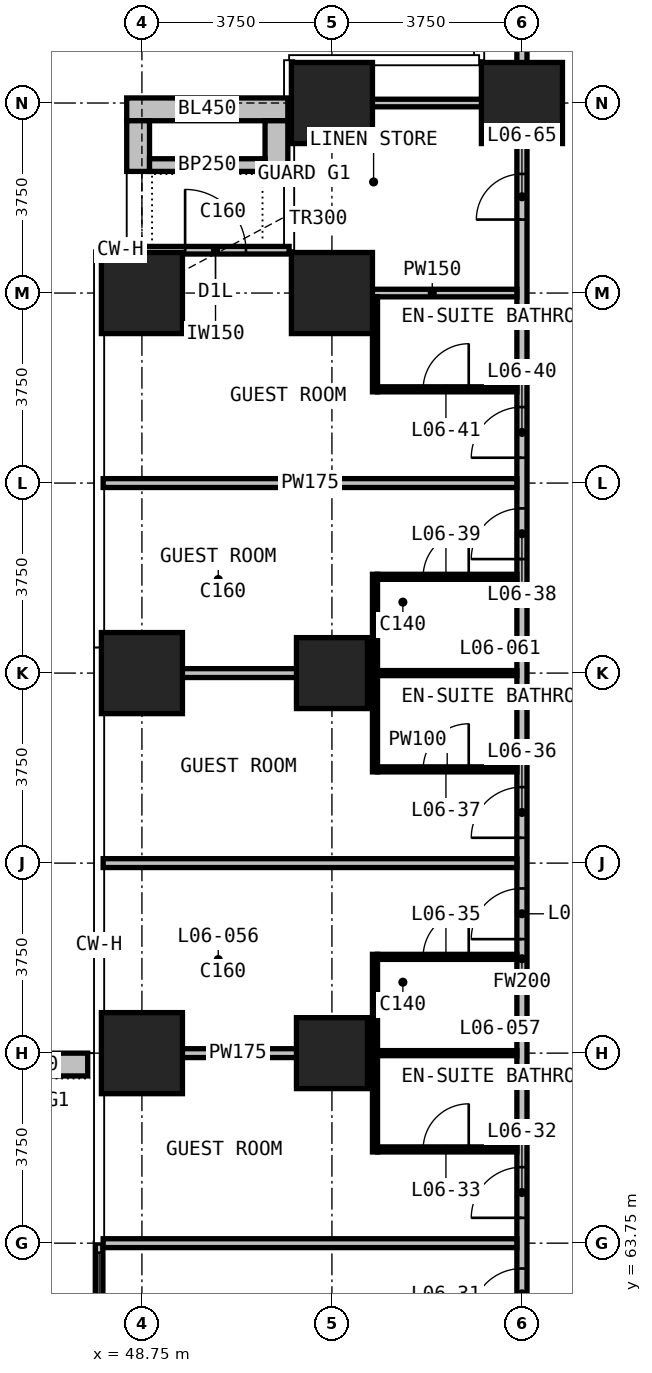
"""IFC4 building model, lengths in metres.
Left out: names, types, materials, properties, quantities, classifications, styles, units other than length and angle.
Written with IfcOpenShell. Run it as: python <this file> out.ifc"""

import sys

from ifc_helpers import new_model, si_unit, direction, frame, frame_2d, origin, origin_2d, place, context, subcontext, project, spatial, rectangle, extrude, element, fill, save


model = new_model("IFC4")
c1 = context("Model", 3, precision=1e-05, world=origin(), true_north=direction((0.0, 1.0)))
c2 = subcontext(c1, "Body", "Model", "MODEL_VIEW")
j1 = project(units=[si_unit("LENGTHUNIT", "METRE"), si_unit("PLANEANGLEUNIT", "RADIAN")], contexts=[c1])
p1 = place(None, origin())
s1 = spatial("IfcSite", under=j1, at=p1, CompositionType="ELEMENT")
p2 = place(p1, origin())
s2 = spatial("IfcBuilding", under=s1, at=p2, CompositionType="ELEMENT")
p3 = place(p2, frame((0.0, 0.0, 39.5)))
s3 = spatial("IfcBuildingStorey", under=s2, at=p3, CompositionType="ELEMENT", Elevation=39.5)
for number, where, z_axis, x_axis in (
    (1, (48.75, 67.5, 0.0), (0.0, 0.0, 1.0), (1.0, 0.0, 0.0)),
    (2, (48.75, 75.0, 0.0), (0.0, 0.0, 1.0), (1.0, 0.0, 0.0)),
    (3, (48.75, 82.5, 0.0), (0.0, 0.0, 1.0), (1.0, 0.0, 0.0)),
):
    element("IfcColumn", number, at=place(p3, frame(where, z_axis=z_axis, x_axis=x_axis)), inside=s3, PredefinedType="COLUMN", context=c2, shape_type="SweptSolid", body=[
        extrude(rectangle(XDim=1.6, YDim=1.6, at=origin_2d()), origin(), (0.0, 0.0, 1.0), 3.3),
    ])
for number, where, z_axis, x_axis in (
    (4, (52.5, 67.5, 0.0), (0.0, 0.0, 1.0), (1.0, 0.0, 0.0)),
    (5, (52.5, 75.0, 0.0), (0.0, 0.0, 1.0), (1.0, 0.0, 0.0)),
):
    element("IfcColumn", number, at=place(p3, frame(where, z_axis=z_axis, x_axis=x_axis)), inside=s3, PredefinedType="COLUMN", context=c2, shape_type="SweptSolid", body=[
        extrude(rectangle(XDim=1.4, YDim=1.4, at=origin_2d()), origin(), (0.0, 0.0, 1.0), 3.3),
    ])
for number, where, z_axis, x_axis in (
    (6, (52.5, 82.5, 0.0), (0.0, 0.0, 1.0), (1.0, 0.0, 0.0)),
    (7, (52.5, 86.25, 0.0), (0.0, 0.0, 1.0), (1.0, 0.0, 0.0)),
    (8, (56.25, 86.25, 0.0), (0.0, 0.0, 1.0), (1.0, 0.0, 0.0)),
):
    element("IfcColumn", number, at=place(p3, frame(where, z_axis=z_axis, x_axis=x_axis)), inside=s3, PredefinedType="COLUMN", context=c2, shape_type="SweptSolid", body=[
        extrude(rectangle(XDim=1.6, YDim=1.6, at=origin_2d()), origin(), (0.0, 0.0, 1.0), 3.3),
    ])
p4 = place(p3, frame((48.75, 83.345, 0.0), z_axis=(0.0, 0.0, 1.0), x_axis=(1.0, 0.0, 0.0)))
e9 = element("IfcWall", 9, at=p4, inside=s3, PredefinedType="SOLIDWALL", context=c2, shape_type="SweptSolid", body=[
    extrude(rectangle(XDim=2.905, YDim=0.15, at=frame_2d((1.453, 0.0))), origin(), (0.0, 0.0, 1.0), 3.0),
])
p5 = place(p4, frame((0.853, 0.0, 0.0)))
e10 = element("IfcOpeningElement", 10, at=p5, cuts=e9, PredefinedType="OPENING", context=c2, shape_type="SweptSolid", body=[
    extrude(rectangle(XDim=1.2, YDim=2.0, at=frame_2d((0.6, 1.0))), frame((0.0, 0.085, 0.0), z_axis=(0.0, -1.0, 0.0), x_axis=(1.0, 0.0, 0.0)), (0.0, 0.0, 1.0), 0.17),
])
p6 = place(p3, frame((47.905, 60.0, 0.0), z_axis=(0.0, 0.0, 1.0), x_axis=(0.0, 1.0, 0.0)))
e11 = element("IfcWall", 11, at=p6, inside=s3, PredefinedType="SOLIDWALL", context=c2, shape_type="SweptSolid", body=[
    extrude(rectangle(XDim=3.75, YDim=0.15, at=frame_2d((1.875, 0.0))), origin(), (0.0, 0.0, 1.0), 3.0),
])
p7 = place(p6, frame((1.275, 0.0, 0.0)))
e12 = element("IfcOpeningElement", 12, at=p7, cuts=e11, PredefinedType="OPENING", context=c2, shape_type="SweptSolid", body=[
    extrude(rectangle(XDim=1.2, YDim=2.4, at=frame_2d((0.6, 1.2))), frame((0.0, 0.085, 0.0), z_axis=(0.0, -1.0, 0.0), x_axis=(1.0, 0.0, 0.0)), (0.0, 0.0, 1.0), 0.17),
])
p8 = place(p6, frame((2.663, 0.0, 0.1)))
e13 = element("IfcOpeningElement", 13, at=p8, cuts=e11, PredefinedType="OPENING", context=c2, shape_type="SweptSolid", body=[
    extrude(rectangle(XDim=0.9, YDim=2.4, at=frame_2d((0.45, 1.2))), frame((0.0, 0.085, 0.0), z_axis=(0.0, -1.0, 0.0), x_axis=(1.0, 0.0, 0.0)), (0.0, 0.0, 1.0), 0.17),
])
p9 = place(p3, frame((48.45, 86.125, 0.0), z_axis=(0.0, 0.0, 1.0), x_axis=(1.0, 0.0, 0.0)))
e14 = element("IfcWall", 14, at=p9, inside=s3, PredefinedType="USERDEFINED", context=c2, shape_type="SweptSolid", body=[
    extrude(rectangle(XDim=3.18, YDim=0.45, at=frame_2d((1.59, 0.0))), origin(), (0.0, 0.0, 1.0), 1.1),
])
for number, where, z_axis, x_axis in (
    (15, (48.675, 84.9, 0.0), (0.0, 0.0, 1.0), (0.0, 1.0, 0.0)),
    (16, (51.405, 84.9, 0.0), (0.0, 0.0, 1.0), (0.0, 1.0, 0.0)),
):
    element("IfcWall", number, at=place(p3, frame(where, z_axis=z_axis, x_axis=x_axis)), inside=s3, PredefinedType="USERDEFINED", context=c2, shape_type="SweptSolid", body=[
        extrude(rectangle(XDim=1.0, YDim=0.45, at=frame_2d((0.5, 0.0))), origin(), (0.0, 0.0, 1.0), 1.1),
    ])
p10 = place(p3, frame((48.9, 85.025, 0.0), z_axis=(0.0, 0.0, 1.0), x_axis=(1.0, 0.0, 0.0)))
e17 = element("IfcWall", 17, at=p10, inside=s3, PredefinedType="USERDEFINED", context=c2, shape_type="SweptSolid", body=[
    extrude(rectangle(XDim=2.28, YDim=0.25, at=frame_2d((1.14, 0.0))), origin(), (0.0, 0.0, 1.0), 1.0),
])
p11 = place(p3, frame((47.68, 67.275, 0.0), z_axis=(0.0, 0.0, 1.0), x_axis=(-1.0, 0.0, 0.0)))
e18 = element("IfcWall", 18, at=p11, inside=s3, PredefinedType="USERDEFINED", context=c2, shape_type="SweptSolid", body=[
    extrude(rectangle(XDim=2.33, YDim=0.45, at=frame_2d((1.165, 0.0))), origin(), (0.0, 0.0, 1.0), 1.1),
])
p12 = place(p3, frame((56.25, 52.4, 0.0), z_axis=(0.0, 0.0, 1.0), x_axis=(0.0, 1.0, 0.0)))
e19 = element("IfcWall", 19, at=p12, inside=s3, PredefinedType="PARTITIONING", context=c2, shape_type="SweptSolid", body=[
    extrude(rectangle(XDim=33.925, YDim=0.2, at=frame_2d((16.962, 0.0))), origin(), (0.0, 0.0, 1.0), 3.0),
])
p13 = place(p12, frame((2.35, 0.0, 0.0)))
e20 = element("IfcOpeningElement", 20, at=p13, cuts=e19, PredefinedType="OPENING", context=c2, shape_type="SweptSolid", body=[
    extrude(rectangle(XDim=1.0, YDim=2.2, at=frame_2d((0.5, 1.1))), frame((0.0, 0.11, 0.0), z_axis=(0.0, -1.0, 0.0), x_axis=(1.0, 0.0, 0.0)), (0.0, 0.0, 1.0), 0.22),
])
p14 = place(p12, frame((4.35, 0.0, 0.0)))
e21 = element("IfcOpeningElement", 21, at=p14, cuts=e19, PredefinedType="OPENING", context=c2, shape_type="SweptSolid", body=[
    extrude(rectangle(XDim=1.0, YDim=2.2, at=frame_2d((0.5, 1.1))), frame((0.0, 0.11, 0.0), z_axis=(0.0, -1.0, 0.0), x_axis=(1.0, 0.0, 0.0)), (0.0, 0.0, 1.0), 0.22),
])
p15 = place(p12, frame((9.85, 0.0, 0.0)))
e22 = element("IfcOpeningElement", 22, at=p15, cuts=e19, PredefinedType="OPENING", context=c2, shape_type="SweptSolid", body=[
    extrude(rectangle(XDim=1.0, YDim=2.2, at=frame_2d((0.5, 1.1))), frame((0.0, 0.11, 0.0), z_axis=(0.0, -1.0, 0.0), x_axis=(1.0, 0.0, 0.0)), (0.0, 0.0, 1.0), 0.22),
])
p16 = place(p12, frame((11.85, 0.0, 0.0)))
e23 = element("IfcOpeningElement", 23, at=p16, cuts=e19, PredefinedType="OPENING", context=c2, shape_type="SweptSolid", body=[
    extrude(rectangle(XDim=1.0, YDim=2.2, at=frame_2d((0.5, 1.1))), frame((0.0, 0.11, 0.0), z_axis=(0.0, -1.0, 0.0), x_axis=(1.0, 0.0, 0.0)), (0.0, 0.0, 1.0), 0.22),
])
p17 = place(p12, frame((17.35, 0.0, 0.0)))
e24 = element("IfcOpeningElement", 24, at=p17, cuts=e19, PredefinedType="OPENING", context=c2, shape_type="SweptSolid", body=[
    extrude(rectangle(XDim=1.0, YDim=2.2, at=frame_2d((0.5, 1.1))), frame((0.0, 0.11, 0.0), z_axis=(0.0, -1.0, 0.0), x_axis=(1.0, 0.0, 0.0)), (0.0, 0.0, 1.0), 0.22),
])
p18 = place(p12, frame((19.35, 0.0, 0.0)))
e25 = element("IfcOpeningElement", 25, at=p18, cuts=e19, PredefinedType="OPENING", context=c2, shape_type="SweptSolid", body=[
    extrude(rectangle(XDim=1.0, YDim=2.2, at=frame_2d((0.5, 1.1))), frame((0.0, 0.11, 0.0), z_axis=(0.0, -1.0, 0.0), x_axis=(1.0, 0.0, 0.0)), (0.0, 0.0, 1.0), 0.22),
])
p19 = place(p12, frame((24.85, 0.0, 0.0)))
e26 = element("IfcOpeningElement", 26, at=p19, cuts=e19, PredefinedType="OPENING", context=c2, shape_type="SweptSolid", body=[
    extrude(rectangle(XDim=1.0, YDim=2.2, at=frame_2d((0.5, 1.1))), frame((0.0, 0.11, 0.0), z_axis=(0.0, -1.0, 0.0), x_axis=(1.0, 0.0, 0.0)), (0.0, 0.0, 1.0), 0.22),
])
p20 = place(p12, frame((26.85, 0.0, 0.0)))
e27 = element("IfcOpeningElement", 27, at=p20, cuts=e19, PredefinedType="OPENING", context=c2, shape_type="SweptSolid", body=[
    extrude(rectangle(XDim=1.0, YDim=2.2, at=frame_2d((0.5, 1.1))), frame((0.0, 0.11, 0.0), z_axis=(0.0, -1.0, 0.0), x_axis=(1.0, 0.0, 0.0)), (0.0, 0.0, 1.0), 0.22),
])
p21 = place(p12, frame((31.55, 0.0, 0.0)))
e28 = element("IfcOpeningElement", 28, at=p21, cuts=e19, PredefinedType="OPENING", context=c2, shape_type="SweptSolid", body=[
    extrude(rectangle(XDim=0.9, YDim=2.2, at=frame_2d((0.45, 1.1))), frame((0.0, 0.11, 0.0), z_axis=(0.0, -1.0, 0.0), x_axis=(1.0, 0.0, 0.0)), (0.0, 0.0, 1.0), 0.22),
])
p22 = place(p3, frame((56.25, 86.28, 0.0), z_axis=(0.0, 0.0, 1.0), x_axis=(0.0, 1.0, 0.0)))
e29 = element("IfcWall", 29, at=p22, inside=s3, PredefinedType="PARTITIONING", context=c2, shape_type="SweptSolid", body=[
    extrude(rectangle(XDim=4.365, YDim=0.2, at=frame_2d((2.183, 0.0))), origin(), (0.0, 0.0, 1.0), 3.0),
])
p23 = place(p3, frame((47.985, 63.75, 0.0), z_axis=(0.0, 0.0, 1.0), x_axis=(1.0, 0.0, 0.0)))
e30 = element("IfcWall", 30, at=p23, inside=s3, PredefinedType="PARTITIONING", context=c2, shape_type="SweptSolid", body=[
    extrude(rectangle(XDim=8.165, YDim=0.175, at=frame_2d((4.083, 0.0))), origin(), (0.0, 0.0, 1.0), 3.0),
])
p24 = place(p3, frame((47.985, 67.5, 0.0), z_axis=(0.0, 0.0, 1.0), x_axis=(1.0, 0.0, 0.0)))
e31 = element("IfcWall", 31, at=p24, inside=s3, PredefinedType="PARTITIONING", context=c2, shape_type="SweptSolid", body=[
    extrude(rectangle(XDim=5.315, YDim=0.175, at=frame_2d((2.657, 0.0))), origin(), (0.0, 0.0, 1.0), 3.0),
])
p25 = place(p3, frame((47.985, 71.25, 0.0), z_axis=(0.0, 0.0, 1.0), x_axis=(1.0, 0.0, 0.0)))
e32 = element("IfcWall", 32, at=p25, inside=s3, PredefinedType="PARTITIONING", context=c2, shape_type="SweptSolid", body=[
    extrude(rectangle(XDim=8.165, YDim=0.175, at=frame_2d((4.083, 0.0))), origin(), (0.0, 0.0, 1.0), 3.0),
])
p26 = place(p3, frame((47.985, 75.0, 0.0), z_axis=(0.0, 0.0, 1.0), x_axis=(1.0, 0.0, 0.0)))
e33 = element("IfcWall", 33, at=p26, inside=s3, PredefinedType="PARTITIONING", context=c2, shape_type="SweptSolid", body=[
    extrude(rectangle(XDim=5.315, YDim=0.175, at=frame_2d((2.657, 0.0))), origin(), (0.0, 0.0, 1.0), 3.0),
])
p27 = place(p3, frame((47.985, 78.75, 0.0), z_axis=(0.0, 0.0, 1.0), x_axis=(1.0, 0.0, 0.0)))
e34 = element("IfcWall", 34, at=p27, inside=s3, PredefinedType="PARTITIONING", context=c2, shape_type="SweptSolid", body=[
    extrude(rectangle(XDim=8.165, YDim=0.175, at=frame_2d((4.083, 0.0))), origin(), (0.0, 0.0, 1.0), 3.0),
])
p28 = place(p3, frame((52.81, 82.5, 0.0), z_axis=(0.0, 0.0, 1.0), x_axis=(1.0, 0.0, 0.0)))
e35 = element("IfcWall", 35, at=p28, inside=s3, PredefinedType="PARTITIONING", context=c2, shape_type="SweptSolid", body=[
    extrude(rectangle(XDim=3.34, YDim=0.15, at=frame_2d((1.67, 0.0))), origin(), (0.0, 0.0, 1.0), 3.0),
])
p29 = place(p3, frame((51.855, 86.25, 0.0), z_axis=(0.0, 0.0, 1.0), x_axis=(1.0, 0.0, 0.0)))
e36 = element("IfcWall", 36, at=p29, inside=s3, PredefinedType="PARTITIONING", context=c2, shape_type="SweptSolid", body=[
    extrude(rectangle(XDim=4.295, YDim=0.15, at=frame_2d((2.147, 0.0))), origin(), (0.0, 0.0, 1.0), 3.0),
])
p30 = place(p3, frame((52.735, 82.425, 0.0), z_axis=(0.0, 0.0, 1.0), x_axis=(0.0, 1.0, 0.0)))
e37 = element("IfcWall", 37, at=p30, inside=s3, PredefinedType="PARTITIONING", context=c2, shape_type="SweptSolid", body=[
    extrude(rectangle(XDim=0.84, YDim=0.15, at=frame_2d((0.42, 0.0))), origin(), (0.0, 0.0, 1.0), 3.0),
])
p31 = place(p3, frame((53.4, 65.6, 0.0), z_axis=(0.0, 0.0, 1.0), x_axis=(1.0, 0.0, 0.0)))
e38 = element("IfcWall", 38, at=p31, inside=s3, PredefinedType="PARTITIONING", context=c2, shape_type="SweptSolid", body=[
    extrude(rectangle(XDim=2.75, YDim=0.1, at=frame_2d((1.375, 0.0))), origin(), (0.0, 0.0, 1.0), 3.0),
])
p32 = place(p31, frame((0.9, 0.0, 0.0)))
e39 = element("IfcOpeningElement", 39, at=p32, cuts=e38, PredefinedType="OPENING", context=c2, shape_type="SweptSolid", body=[
    extrude(rectangle(XDim=0.9, YDim=2.2, at=frame_2d((0.45, 1.1))), frame((0.0, 0.06, 0.0), z_axis=(0.0, -1.0, 0.0), x_axis=(1.0, 0.0, 0.0)), (0.0, 0.0, 1.0), 0.12),
])
p33 = place(p3, frame((53.4, 67.5, 0.0), z_axis=(0.0, 0.0, 1.0), x_axis=(1.0, 0.0, 0.0)))
e40 = element("IfcWall", 40, at=p33, inside=s3, PredefinedType="PARTITIONING", context=c2, shape_type="SweptSolid", body=[
    extrude(rectangle(XDim=2.75, YDim=0.1, at=frame_2d((1.375, 0.0))), origin(), (0.0, 0.0, 1.0), 3.0),
])
p34 = place(p3, frame((53.4, 69.4, 0.0), z_axis=(0.0, 0.0, 1.0), x_axis=(1.0, 0.0, 0.0)))
e41 = element("IfcWall", 41, at=p34, inside=s3, PredefinedType="PARTITIONING", context=c2, shape_type="SweptSolid", body=[
    extrude(rectangle(XDim=2.75, YDim=0.1, at=frame_2d((1.375, 0.0))), origin(), (0.0, 0.0, 1.0), 3.0),
])
p35 = place(p34, frame((0.9, 0.0, 0.0)))
e42 = element("IfcOpeningElement", 42, at=p35, cuts=e41, PredefinedType="OPENING", context=c2, shape_type="SweptSolid", body=[
    extrude(rectangle(XDim=0.9, YDim=2.2, at=frame_2d((0.45, 1.1))), frame((0.0, 0.06, 0.0), z_axis=(0.0, -1.0, 0.0), x_axis=(1.0, 0.0, 0.0)), (0.0, 0.0, 1.0), 0.12),
])
p36 = place(p3, frame((53.4, 73.1, 0.0), z_axis=(0.0, 0.0, 1.0), x_axis=(1.0, 0.0, 0.0)))
e43 = element("IfcWall", 43, at=p36, inside=s3, PredefinedType="PARTITIONING", context=c2, shape_type="SweptSolid", body=[
    extrude(rectangle(XDim=2.75, YDim=0.1, at=frame_2d((1.375, 0.0))), origin(), (0.0, 0.0, 1.0), 3.0),
])
p37 = place(p36, frame((0.9, 0.0, 0.0)))
e44 = element("IfcOpeningElement", 44, at=p37, cuts=e43, PredefinedType="OPENING", context=c2, shape_type="SweptSolid", body=[
    extrude(rectangle(XDim=0.9, YDim=2.2, at=frame_2d((0.45, 1.1))), frame((0.0, 0.06, 0.0), z_axis=(0.0, -1.0, 0.0), x_axis=(1.0, 0.0, 0.0)), (0.0, 0.0, 1.0), 0.12),
])
p38 = place(p3, frame((53.4, 75.0, 0.0), z_axis=(0.0, 0.0, 1.0), x_axis=(1.0, 0.0, 0.0)))
e45 = element("IfcWall", 45, at=p38, inside=s3, PredefinedType="PARTITIONING", context=c2, shape_type="SweptSolid", body=[
    extrude(rectangle(XDim=2.75, YDim=0.1, at=frame_2d((1.375, 0.0))), origin(), (0.0, 0.0, 1.0), 3.0),
])
p39 = place(p3, frame((53.4, 76.9, 0.0), z_axis=(0.0, 0.0, 1.0), x_axis=(1.0, 0.0, 0.0)))
e46 = element("IfcWall", 46, at=p39, inside=s3, PredefinedType="PARTITIONING", context=c2, shape_type="SweptSolid", body=[
    extrude(rectangle(XDim=2.75, YDim=0.1, at=frame_2d((1.375, 0.0))), origin(), (0.0, 0.0, 1.0), 3.0),
])
p40 = place(p39, frame((0.9, 0.0, 0.0)))
e47 = element("IfcOpeningElement", 47, at=p40, cuts=e46, PredefinedType="OPENING", context=c2, shape_type="SweptSolid", body=[
    extrude(rectangle(XDim=0.9, YDim=2.2, at=frame_2d((0.45, 1.1))), frame((0.0, 0.06, 0.0), z_axis=(0.0, -1.0, 0.0), x_axis=(1.0, 0.0, 0.0)), (0.0, 0.0, 1.0), 0.12),
])
p41 = place(p3, frame((53.4, 80.6, 0.0), z_axis=(0.0, 0.0, 1.0), x_axis=(1.0, 0.0, 0.0)))
e48 = element("IfcWall", 48, at=p41, inside=s3, PredefinedType="PARTITIONING", context=c2, shape_type="SweptSolid", body=[
    extrude(rectangle(XDim=2.75, YDim=0.1, at=frame_2d((1.375, 0.0))), origin(), (0.0, 0.0, 1.0), 3.0),
])
p42 = place(p41, frame((0.9, 0.0, 0.0)))
e49 = element("IfcOpeningElement", 49, at=p42, cuts=e48, PredefinedType="OPENING", context=c2, shape_type="SweptSolid", body=[
    extrude(rectangle(XDim=0.9, YDim=2.2, at=frame_2d((0.45, 1.1))), frame((0.0, 0.06, 0.0), z_axis=(0.0, -1.0, 0.0), x_axis=(1.0, 0.0, 0.0)), (0.0, 0.0, 1.0), 0.12),
])
for number, where, z_axis, x_axis in (
    (50, (53.35, 65.55, 0.0), (0.0, 0.0, 1.0), (0.0, 1.0, 0.0)),
    (51, (53.35, 73.05, 0.0), (0.0, 0.0, 1.0), (0.0, 1.0, 0.0)),
):
    element("IfcWall", number, at=place(p3, frame(where, z_axis=z_axis, x_axis=x_axis)), inside=s3, PredefinedType="PARTITIONING", context=c2, shape_type="SweptSolid", body=[
        extrude(rectangle(XDim=3.9, YDim=0.1, at=frame_2d((1.95, 0.0))), origin(), (0.0, 0.0, 1.0), 3.0),
    ])
p43 = place(p3, frame((53.35, 80.55, 0.0), z_axis=(0.0, 0.0, 1.0), x_axis=(0.0, 1.0, 0.0)))
e52 = element("IfcWall", 52, at=p43, inside=s3, PredefinedType="PARTITIONING", context=c2, shape_type="SweptSolid", body=[
    extrude(rectangle(XDim=1.875, YDim=0.1, at=frame_2d((0.938, 0.0))), origin(), (0.0, 0.0, 1.0), 3.0),
])
p44 = place(p5, origin())
e53 = element("IfcDoor", 53, at=p44, inside=s3, OperationType="SINGLE_SWING_LEFT", PredefinedType="DOOR", context=c2, shape_type="SweptSolid", body=[
    extrude(rectangle(XDim=1.2, YDim=2.0, at=frame_2d((0.6, 1.0))), frame((0.0, 0.025, 0.0), z_axis=(0.0, -1.0, 0.0), x_axis=(1.0, 0.0, 0.0)), (0.0, 0.0, 1.0), 0.05),
])
fill(e10, e53)
p45 = place(p8, origin())
e54 = element("IfcWindow", 54, at=p45, inside=s3, PartitioningType="SINGLE_PANEL", PredefinedType="WINDOW", context=c2, shape_type="SweptSolid", body=[
    extrude(rectangle(XDim=0.9, YDim=2.4, at=frame_2d((0.45, 1.2))), frame((0.0, 0.03, 0.0), z_axis=(0.0, -1.0, 0.0), x_axis=(1.0, 0.0, 0.0)), (0.0, 0.0, 1.0), 0.06),
])
fill(e13, e54)
p46 = place(p15, origin())
e55 = element("IfcDoor", 55, at=p46, inside=s3, OperationType="SINGLE_SWING_LEFT", PredefinedType="DOOR", context=c2, shape_type="SweptSolid", body=[
    extrude(rectangle(XDim=1.0, YDim=2.2, at=frame_2d((0.5, 1.1))), frame((0.0, 0.025, 0.0), z_axis=(0.0, -1.0, 0.0), x_axis=(1.0, 0.0, 0.0)), (0.0, 0.0, 1.0), 0.05),
])
fill(e22, e55)
p47 = place(p16, origin())
e56 = element("IfcDoor", 56, at=p47, inside=s3, OperationType="SINGLE_SWING_LEFT", PredefinedType="DOOR", context=c2, shape_type="SweptSolid", body=[
    extrude(rectangle(XDim=1.0, YDim=2.2, at=frame_2d((0.5, 1.1))), frame((0.0, 0.025, 0.0), z_axis=(0.0, -1.0, 0.0), x_axis=(1.0, 0.0, 0.0)), (0.0, 0.0, 1.0), 0.05),
])
fill(e23, e56)
p48 = place(p32, origin())
e57 = element("IfcDoor", 57, at=p48, inside=s3, OperationType="SINGLE_SWING_RIGHT", PredefinedType="DOOR", context=c2, shape_type="SweptSolid", body=[
    extrude(rectangle(XDim=0.9, YDim=2.2, at=frame_2d((0.45, 1.1))), frame((0.0, 0.025, 0.0), z_axis=(0.0, -1.0, 0.0), x_axis=(1.0, 0.0, 0.0)), (0.0, 0.0, 1.0), 0.05),
])
fill(e39, e57)
p49 = place(p17, origin())
e58 = element("IfcDoor", 58, at=p49, inside=s3, OperationType="SINGLE_SWING_LEFT", PredefinedType="DOOR", context=c2, shape_type="SweptSolid", body=[
    extrude(rectangle(XDim=1.0, YDim=2.2, at=frame_2d((0.5, 1.1))), frame((0.0, 0.025, 0.0), z_axis=(0.0, -1.0, 0.0), x_axis=(1.0, 0.0, 0.0)), (0.0, 0.0, 1.0), 0.05),
])
fill(e24, e58)
p50 = place(p35, origin())
e59 = element("IfcDoor", 59, at=p50, inside=s3, OperationType="SINGLE_SWING_RIGHT", PredefinedType="DOOR", context=c2, shape_type="SweptSolid", body=[
    extrude(rectangle(XDim=0.9, YDim=2.2, at=frame_2d((0.45, 1.1))), frame((0.0, 0.025, 0.0), z_axis=(0.0, -1.0, 0.0), x_axis=(1.0, 0.0, 0.0)), (0.0, 0.0, 1.0), 0.05),
])
fill(e42, e59)
p51 = place(p18, origin())
e60 = element("IfcDoor", 60, at=p51, inside=s3, OperationType="SINGLE_SWING_LEFT", PredefinedType="DOOR", context=c2, shape_type="SweptSolid", body=[
    extrude(rectangle(XDim=1.0, YDim=2.2, at=frame_2d((0.5, 1.1))), frame((0.0, 0.025, 0.0), z_axis=(0.0, -1.0, 0.0), x_axis=(1.0, 0.0, 0.0)), (0.0, 0.0, 1.0), 0.05),
])
fill(e25, e60)
p52 = place(p37, origin())
e61 = element("IfcDoor", 61, at=p52, inside=s3, OperationType="SINGLE_SWING_RIGHT", PredefinedType="DOOR", context=c2, shape_type="SweptSolid", body=[
    extrude(rectangle(XDim=0.9, YDim=2.2, at=frame_2d((0.45, 1.1))), frame((0.0, 0.025, 0.0), z_axis=(0.0, -1.0, 0.0), x_axis=(1.0, 0.0, 0.0)), (0.0, 0.0, 1.0), 0.05),
])
fill(e44, e61)
p53 = place(p19, origin())
e62 = element("IfcDoor", 62, at=p53, inside=s3, OperationType="SINGLE_SWING_LEFT", PredefinedType="DOOR", context=c2, shape_type="SweptSolid", body=[
    extrude(rectangle(XDim=1.0, YDim=2.2, at=frame_2d((0.5, 1.1))), frame((0.0, 0.025, 0.0), z_axis=(0.0, -1.0, 0.0), x_axis=(1.0, 0.0, 0.0)), (0.0, 0.0, 1.0), 0.05),
])
fill(e26, e62)
p54 = place(p40, origin())
e63 = element("IfcDoor", 63, at=p54, inside=s3, OperationType="SINGLE_SWING_RIGHT", PredefinedType="DOOR", context=c2, shape_type="SweptSolid", body=[
    extrude(rectangle(XDim=0.9, YDim=2.2, at=frame_2d((0.45, 1.1))), frame((0.0, 0.025, 0.0), z_axis=(0.0, -1.0, 0.0), x_axis=(1.0, 0.0, 0.0)), (0.0, 0.0, 1.0), 0.05),
])
fill(e47, e63)
p55 = place(p20, origin())
e64 = element("IfcDoor", 64, at=p55, inside=s3, OperationType="SINGLE_SWING_LEFT", PredefinedType="DOOR", context=c2, shape_type="SweptSolid", body=[
    extrude(rectangle(XDim=1.0, YDim=2.2, at=frame_2d((0.5, 1.1))), frame((0.0, 0.025, 0.0), z_axis=(0.0, -1.0, 0.0), x_axis=(1.0, 0.0, 0.0)), (0.0, 0.0, 1.0), 0.05),
])
fill(e27, e64)
p56 = place(p42, origin())
e65 = element("IfcDoor", 65, at=p56, inside=s3, OperationType="SINGLE_SWING_RIGHT", PredefinedType="DOOR", context=c2, shape_type="SweptSolid", body=[
    extrude(rectangle(XDim=0.9, YDim=2.2, at=frame_2d((0.45, 1.1))), frame((0.0, 0.025, 0.0), z_axis=(0.0, -1.0, 0.0), x_axis=(1.0, 0.0, 0.0)), (0.0, 0.0, 1.0), 0.05),
])
fill(e49, e65)
p57 = place(p21, origin())
e66 = element("IfcDoor", 66, at=p57, inside=s3, OperationType="SINGLE_SWING_RIGHT", PredefinedType="DOOR", context=c2, shape_type="SweptSolid", body=[
    extrude(rectangle(XDim=0.9, YDim=2.2, at=frame_2d((0.45, 1.1))), frame((0.0, 0.025, 0.0), z_axis=(0.0, -1.0, 0.0), x_axis=(1.0, 0.0, 0.0)), (0.0, 0.0, 1.0), 0.05),
])
fill(e28, e66)
save(model, sys.argv[1])
